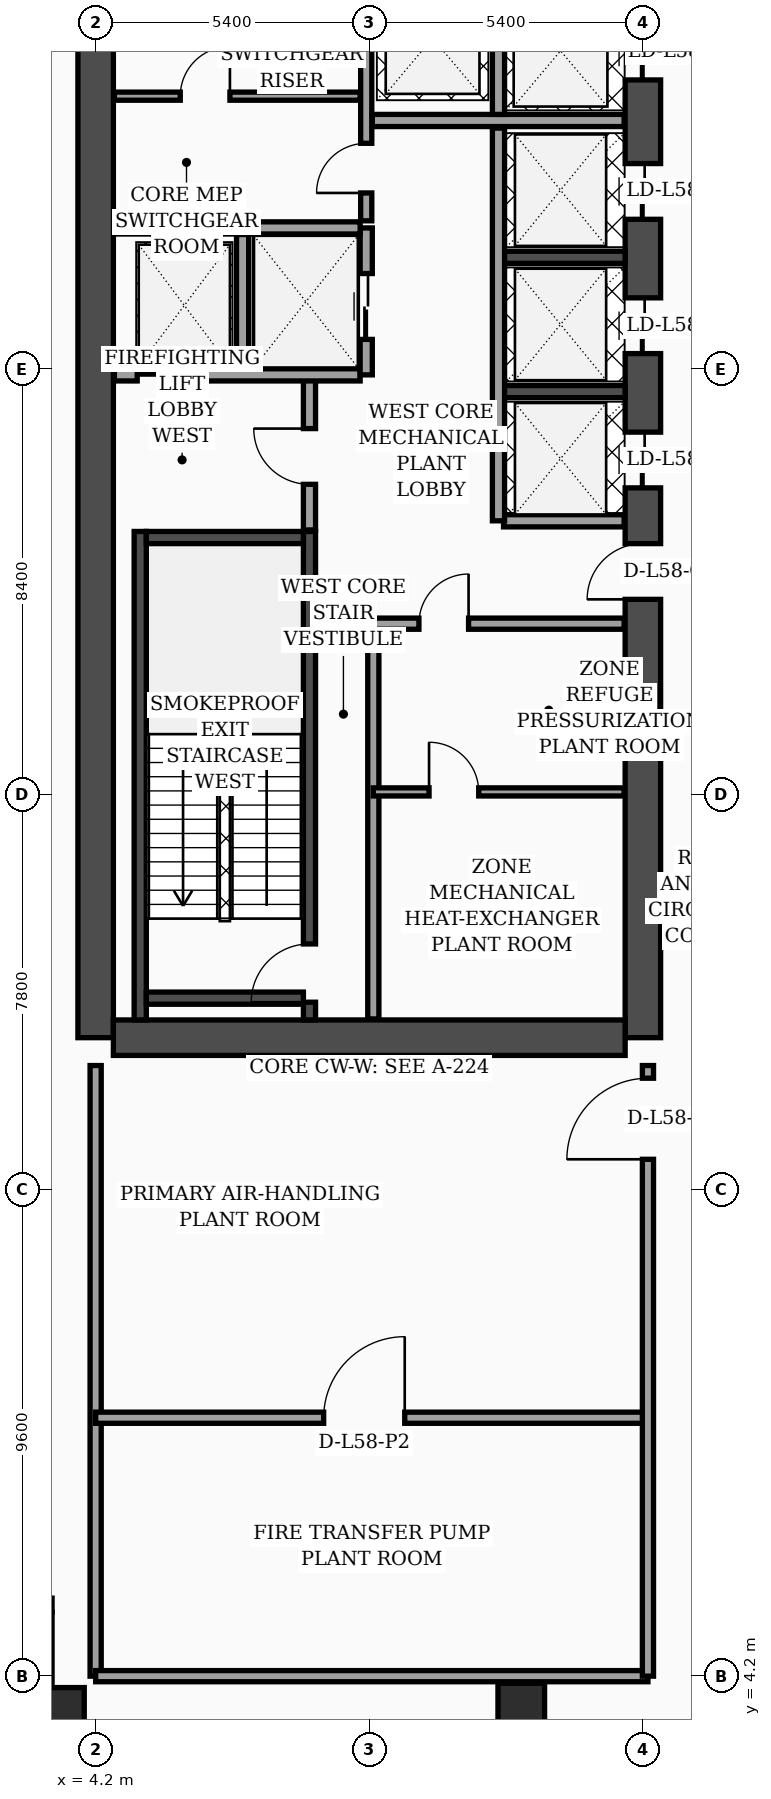
"""IFC4 building model, lengths in metres.
Left out: names, types, materials, properties, quantities, classifications, styles, units other than length and angle.
Written with IfcOpenShell. Run it as: python <this file> out.ifc"""

import sys

from ifc_helpers import new_model, si_unit, direction, frame, frame_2d, origin, origin_2d, place, context, subcontext, project, spatial, rectangle, hollow_rectangle, extrude, element, fill, save


model = new_model("IFC4")
c1 = context("Model", 3, precision=1e-05, world=origin(), true_north=direction((0.0, 1.0)))
c2 = subcontext(c1, "Body", "Model", "MODEL_VIEW")
j1 = project(units=[si_unit("LENGTHUNIT", "METRE"), si_unit("PLANEANGLEUNIT", "RADIAN")], contexts=[c1])
p1 = place(None, origin())
s1 = spatial("IfcSite", under=j1, at=p1, CompositionType="ELEMENT")
p2 = place(p1, origin())
s2 = spatial("IfcBuilding", under=s1, at=p2, CompositionType="ELEMENT")
p3 = place(p2, frame((0.0, 0.0, 234.5)))
s3 = spatial("IfcBuildingStorey", under=s2, at=p3, CompositionType="ELEMENT", Elevation=234.5)
p4 = place(p3, frame((4.2, 16.8, 0.0), z_axis=(0.0, 0.0, 1.0), x_axis=(0.0, 1.0, 0.0)))
e1 = element("IfcWall", 1, at=p4, inside=s3, PredefinedType="SHEAR", context=c2, shape_type="SweptSolid", body=[
    extrude(rectangle(XDim=21.6, YDim=0.7, at=frame_2d((10.8, 0.0))), origin(), (0.0, 0.0, 1.0), 4.56),
])
p5 = place(p3, frame((15.0, 16.8, 0.0), z_axis=(0.0, 0.0, 1.0), x_axis=(0.0, 1.0, 0.0)))
e2 = element("IfcWall", 2, at=p5, inside=s3, PredefinedType="SHEAR", context=c2, shape_type="SweptSolid", body=[
    extrude(rectangle(XDim=21.6, YDim=0.7, at=frame_2d((10.8, 0.0))), origin(), (0.0, 0.0, 1.0), 4.56),
])
p6 = place(p5, frame((8.65, 0.0, 0.0)))
e3 = element("IfcOpeningElement", 3, at=p6, cuts=e2, PredefinedType="OPENING", context=c2, shape_type="SweptSolid", body=[
    extrude(rectangle(XDim=1.1, YDim=2.2, at=frame_2d((0.55, 1.1))), frame((0.0, 0.36, 0.0), z_axis=(0.0, -1.0, 0.0), x_axis=(1.0, 0.0, 0.0)), (0.0, 0.0, 1.0), 0.72),
])
p7 = place(p5, frame((10.85, 0.0, 0.0)))
e4 = element("IfcOpeningElement", 4, at=p7, cuts=e2, PredefinedType="OPENING", context=c2, shape_type="SweptSolid", body=[
    extrude(rectangle(XDim=1.1, YDim=2.2, at=frame_2d((0.55, 1.1))), frame((0.0, 0.36, 0.0), z_axis=(0.0, -1.0, 0.0), x_axis=(1.0, 0.0, 0.0)), (0.0, 0.0, 1.0), 0.72),
])
p8 = place(p5, frame((13.5, 0.0, 0.0)))
e5 = element("IfcOpeningElement", 5, at=p8, cuts=e2, PredefinedType="OPENING", context=c2, shape_type="SweptSolid", body=[
    extrude(rectangle(XDim=1.1, YDim=2.2, at=frame_2d((0.55, 1.1))), frame((0.0, 0.36, 0.0), z_axis=(0.0, -1.0, 0.0), x_axis=(1.0, 0.0, 0.0)), (0.0, 0.0, 1.0), 0.72),
])
p9 = place(p5, frame((16.15, 0.0, 0.0)))
e6 = element("IfcOpeningElement", 6, at=p9, cuts=e2, PredefinedType="OPENING", context=c2, shape_type="SweptSolid", body=[
    extrude(rectangle(XDim=1.1, YDim=2.2, at=frame_2d((0.55, 1.1))), frame((0.0, 0.36, 0.0), z_axis=(0.0, -1.0, 0.0), x_axis=(1.0, 0.0, 0.0)), (0.0, 0.0, 1.0), 0.72),
])
p10 = place(p5, frame((18.9, 0.0, 0.0)))
e7 = element("IfcOpeningElement", 7, at=p10, cuts=e2, PredefinedType="OPENING", context=c2, shape_type="SweptSolid", body=[
    extrude(rectangle(XDim=1.1, YDim=2.2, at=frame_2d((0.55, 1.1))), frame((0.0, 0.36, 0.0), z_axis=(0.0, -1.0, 0.0), x_axis=(1.0, 0.0, 0.0)), (0.0, 0.0, 1.0), 0.72),
])
p11 = place(p3, frame((4.55, 16.8, 0.0), z_axis=(0.0, 0.0, 1.0), x_axis=(1.0, 0.0, 0.0)))
e8 = element("IfcWall", 8, at=p11, inside=s3, PredefinedType="SHEAR", context=c2, shape_type="SweptSolid", body=[
    extrude(rectangle(XDim=10.1, YDim=0.7, at=frame_2d((5.05, 0.0))), origin(), (0.0, 0.0, 1.0), 4.56),
])
p12 = place(p3, frame((5.08, 17.15, 0.0), z_axis=(0.0, 0.0, 1.0), x_axis=(0.0, 1.0, 0.0)))
e9 = element("IfcWall", 9, at=p12, inside=s3, PredefinedType="SOLIDWALL", context=c2, shape_type="SweptSolid", body=[
    extrude(rectangle(XDim=9.64, YDim=0.24, at=frame_2d((4.82, 0.0))), origin(), (0.0, 0.0, 1.0), 4.56),
])
p13 = place(p3, frame((8.42, 17.15, 0.0), z_axis=(0.0, 0.0, 1.0), x_axis=(0.0, 1.0, 0.0)))
e10 = element("IfcWall", 10, at=p13, inside=s3, PredefinedType="SOLIDWALL", context=c2, shape_type="SweptSolid", body=[
    extrude(rectangle(XDim=9.64, YDim=0.24, at=frame_2d((4.82, 0.0))), origin(), (0.0, 0.0, 1.0), 4.56),
])
p14 = place(p13, frame((0.35, 0.0, 0.0)))
e11 = element("IfcOpeningElement", 11, at=p14, cuts=e10, PredefinedType="OPENING", context=c2, shape_type="SweptSolid", body=[
    extrude(rectangle(XDim=1.15, YDim=2.2, at=frame_2d((0.575, 1.1))), frame((0.0, 0.13, 0.0), z_axis=(0.0, -1.0, 0.0), x_axis=(1.0, 0.0, 0.0)), (0.0, 0.0, 1.0), 0.26),
])
for number, where, z_axis, x_axis in (
    (12, (5.2, 17.58, 0.0), (0.0, 0.0, 1.0), (1.0, 0.0, 0.0)),
    (13, (5.2, 26.67, 0.0), (0.0, 0.0, 1.0), (1.0, 0.0, 0.0)),
):
    element("IfcWall", number, at=place(p3, frame(where, z_axis=z_axis, x_axis=x_axis)), inside=s3, PredefinedType="SOLIDWALL", context=c2, shape_type="SweptSolid", body=[
        extrude(rectangle(XDim=3.1, YDim=0.24, at=frame_2d((1.55, 0.0))), origin(), (0.0, 0.0, 1.0), 4.56),
    ])
for number, where, z_axis, x_axis in (
    (14, (12.18, 29.55, 0.0), (0.0, 0.0, 1.0), (1.0, 0.0, 0.0)),
    (15, (12.18, 32.2, 0.0), (0.0, 0.0, 1.0), (1.0, 0.0, 0.0)),
):
    element("IfcWall", number, at=place(p3, frame(where, z_axis=z_axis, x_axis=x_axis)), inside=s3, PredefinedType="SOLIDWALL", context=c2, shape_type="SweptSolid", body=[
        extrude(rectangle(XDim=2.47, YDim=0.24, at=frame_2d((1.235, 0.0))), origin(), (0.0, 0.0, 1.0), 4.56),
    ])
p15 = place(p3, frame((3.6, 3.6, 0.0), z_axis=(0.0, 0.0, 1.0), x_axis=(1.0, 0.0, 0.0)))
e16 = element("IfcColumn", 16, at=p15, inside=s3, PredefinedType="COLUMN", context=c2, shape_type="SweptSolid", body=[
    extrude(hollow_rectangle(XDim=0.75, YDim=0.75, WallThickness=0.032, at=origin_2d()), origin(), (0.0, 0.0, 1.0), 4.56),
])
p16 = place(p3, frame((12.6, 3.6, 0.0), z_axis=(0.0, 0.0, 1.0), x_axis=(1.0, 0.0, 0.0)))
e17 = element("IfcColumn", 17, at=p16, inside=s3, PredefinedType="COLUMN", context=c2, shape_type="SweptSolid", body=[
    extrude(rectangle(XDim=0.92, YDim=0.92, at=origin_2d()), origin(), (0.0, 0.0, 1.0), 4.56),
])
p17 = place(p3, frame((8.42, 26.82, 0.0), z_axis=(0.0, 0.0, 1.0), x_axis=(0.0, 1.0, 0.0)))
e18 = element("IfcWall", 18, at=p17, inside=s3, PredefinedType="SOLIDWALL", context=c2, shape_type="SweptSolid", body=[
    extrude(rectangle(XDim=3.0, YDim=0.24, at=frame_2d((1.5, 0.0))), origin(), (0.0, 0.0, 1.0), 4.56),
])
p18 = place(p17, frame((0.9, 0.0, 0.0)))
e19 = element("IfcOpeningElement", 19, at=p18, cuts=e18, PredefinedType="OPENING", context=c2, shape_type="SweptSolid", body=[
    extrude(rectangle(XDim=1.1, YDim=2.2, at=frame_2d((0.55, 1.1))), frame((0.0, 0.13, 0.0), z_axis=(0.0, -1.0, 0.0), x_axis=(1.0, 0.0, 0.0)), (0.0, 0.0, 1.0), 0.26),
])
p19 = place(p3, frame((4.57, 29.88, 0.0), z_axis=(0.0, 0.0, 1.0), x_axis=(1.0, 0.0, 0.0)))
e20 = element("IfcWall", 20, at=p19, inside=s3, PredefinedType="SOLIDWALL", context=c2, shape_type="SweptSolid", body=[
    extrude(rectangle(XDim=4.85, YDim=0.24, at=frame_2d((2.425, 0.0))), origin(), (0.0, 0.0, 1.0), 4.56),
])
p20 = place(p19, frame((0.45, 0.0, 0.0)))
e21 = element("IfcOpeningElement", 21, at=p20, cuts=e20, PredefinedType="OPENING", context=c2, shape_type="SweptSolid", body=[
    extrude(rectangle(XDim=1.3, YDim=2.35, at=frame_2d((0.65, 1.175))), frame((0.0, 0.13, 0.0), z_axis=(0.0, -1.0, 0.0), x_axis=(1.0, 0.0, 0.0)), (0.0, 0.0, 1.0), 0.26),
])
p21 = place(p3, frame((7.1, 30.02, 0.0), z_axis=(0.0, 0.0, 1.0), x_axis=(0.0, 1.0, 0.0)))
e22 = element("IfcWall", 22, at=p21, inside=s3, PredefinedType="SOLIDWALL", context=c2, shape_type="SweptSolid", body=[
    extrude(rectangle(XDim=2.63, YDim=0.24, at=frame_2d((1.315, 0.0))), origin(), (0.0, 0.0, 1.0), 4.56),
])
p22 = place(p3, frame((9.54, 29.88, 0.0), z_axis=(0.0, 0.0, 1.0), x_axis=(0.0, 1.0, 0.0)))
e23 = element("IfcWall", 23, at=p22, inside=s3, PredefinedType="SOLIDWALL", context=c2, shape_type="SweptSolid", body=[
    extrude(rectangle(XDim=2.9, YDim=0.24, at=frame_2d((1.45, 0.0))), origin(), (0.0, 0.0, 1.0), 4.56),
])
p23 = place(p22, frame((0.7, 0.0, 0.0)))
e24 = element("IfcOpeningElement", 24, at=p23, cuts=e23, PredefinedType="OPENING", context=c2, shape_type="SweptSolid", body=[
    extrude(rectangle(XDim=1.3, YDim=2.35, at=frame_2d((0.65, 1.175))), frame((0.0, 0.13, 0.0), z_axis=(0.0, -1.0, 0.0), x_axis=(1.0, 0.0, 0.0)), (0.0, 0.0, 1.0), 0.26),
])
p24 = place(p3, frame((4.57, 32.78, 0.0), z_axis=(0.0, 0.0, 1.0), x_axis=(1.0, 0.0, 0.0)))
e25 = element("IfcWall", 25, at=p24, inside=s3, PredefinedType="SOLIDWALL", context=c2, shape_type="SweptSolid", body=[
    extrude(rectangle(XDim=4.85, YDim=0.24, at=frame_2d((2.425, 0.0))), origin(), (0.0, 0.0, 1.0), 4.19),
])
p25 = place(p3, frame((9.68, 17.17, 0.0), z_axis=(0.0, 0.0, 1.0), x_axis=(0.0, 1.0, 0.0)))
e26 = element("IfcWall", 26, at=p25, inside=s3, PredefinedType="SOLIDWALL", context=c2, shape_type="SweptSolid", body=[
    extrude(rectangle(XDim=7.83, YDim=0.22, at=frame_2d((3.915, 0.0))), origin(), (0.0, 0.0, 1.0), 4.56),
])
p26 = place(p3, frame((4.57, 35.38, 0.0), z_axis=(0.0, 0.0, 1.0), x_axis=(1.0, 0.0, 0.0)))
e27 = element("IfcWall", 27, at=p26, inside=s3, PredefinedType="PARTITIONING", context=c2, shape_type="SweptSolid", body=[
    extrude(rectangle(XDim=4.85, YDim=0.16, at=frame_2d((2.425, 0.0))), origin(), (0.0, 0.0, 1.0), 4.56),
])
p27 = place(p26, frame((1.3, 0.0, 0.0)))
e28 = element("IfcOpeningElement", 28, at=p27, cuts=e27, PredefinedType="OPENING", context=c2, shape_type="SweptSolid", body=[
    extrude(rectangle(XDim=0.98, YDim=2.15, at=frame_2d((0.49, 1.075))), frame((0.0, 0.09, 0.0), z_axis=(0.0, -1.0, 0.0), x_axis=(1.0, 0.0, 0.0)), (0.0, 0.0, 1.0), 0.18),
])
p28 = place(p3, frame((9.54, 32.92, 0.0), z_axis=(0.0, 0.0, 1.0), x_axis=(0.0, 1.0, 0.0)))
e29 = element("IfcWall", 29, at=p28, inside=s3, PredefinedType="SOLIDWALL", context=c2, shape_type="SweptSolid", body=[
    extrude(rectangle(XDim=5.11, YDim=0.22, at=frame_2d((2.555, 0.0))), origin(), (0.0, 0.0, 1.0), 4.56),
])
p29 = place(p28, frame((0.55, 0.0, 0.0)))
e30 = element("IfcOpeningElement", 30, at=p29, cuts=e29, PredefinedType="OPENING", context=c2, shape_type="SweptSolid", body=[
    extrude(rectangle(XDim=0.98, YDim=2.15, at=frame_2d((0.49, 1.075))), frame((0.0, 0.12, 0.0), z_axis=(0.0, -1.0, 0.0), x_axis=(1.0, 0.0, 0.0)), (0.0, 0.0, 1.0), 0.24),
])
p30 = place(p3, frame((9.68, 21.65, 0.0), z_axis=(0.0, 0.0, 1.0), x_axis=(1.0, 0.0, 0.0)))
e31 = element("IfcWall", 31, at=p30, inside=s3, PredefinedType="PARTITIONING", context=c2, shape_type="SweptSolid", body=[
    extrude(rectangle(XDim=4.95, YDim=0.16, at=frame_2d((2.475, 0.0))), origin(), (0.0, 0.0, 1.0), 4.56),
])
p31 = place(p30, frame((1.1, 0.0, 0.0)))
e32 = element("IfcOpeningElement", 32, at=p31, cuts=e31, PredefinedType="OPENING", context=c2, shape_type="SweptSolid", body=[
    extrude(rectangle(XDim=0.98, YDim=2.15, at=frame_2d((0.49, 1.075))), frame((0.0, 0.09, 0.0), z_axis=(0.0, -1.0, 0.0), x_axis=(1.0, 0.0, 0.0)), (0.0, 0.0, 1.0), 0.18),
])
p32 = place(p3, frame((9.68, 24.97, 0.0), z_axis=(0.0, 0.0, 1.0), x_axis=(1.0, 0.0, 0.0)))
e33 = element("IfcWall", 33, at=p32, inside=s3, PredefinedType="SOLIDWALL", context=c2, shape_type="SweptSolid", body=[
    extrude(rectangle(XDim=4.95, YDim=0.22, at=frame_2d((2.475, 0.0))), origin(), (0.0, 0.0, 1.0), 3.94),
])
p33 = place(p32, frame((0.9, 0.0, 0.0)))
e34 = element("IfcOpeningElement", 34, at=p33, cuts=e33, PredefinedType="OPENING", context=c2, shape_type="SweptSolid", body=[
    extrude(rectangle(XDim=0.98, YDim=2.15, at=frame_2d((0.49, 1.075))), frame((0.0, 0.12, 0.0), z_axis=(0.0, -1.0, 0.0), x_axis=(1.0, 0.0, 0.0)), (0.0, 0.0, 1.0), 0.24),
])
p34 = place(p3, frame((12.25, 27.0, 0.0), z_axis=(0.0, 0.0, 1.0), x_axis=(1.0, 0.0, 0.0)))
e35 = element("IfcWall", 35, at=p34, inside=s3, PredefinedType="SOLIDWALL", context=c2, shape_type="SweptSolid", body=[
    extrude(rectangle(XDim=2.38, YDim=0.24, at=frame_2d((1.19, 0.0))), origin(), (0.0, 0.0, 1.0), 4.56),
])
p35 = place(p3, frame((12.15, 27.0, 0.0), z_axis=(0.0, 0.0, 1.0), x_axis=(0.0, 1.0, 0.0)))
e36 = element("IfcWall", 36, at=p35, inside=s3, PredefinedType="SOLIDWALL", context=c2, shape_type="SweptSolid", body=[
    extrude(rectangle(XDim=7.75, YDim=0.24, at=frame_2d((3.875, 0.0))), origin(), (0.0, 0.0, 1.0), 4.56),
])
p36 = place(p3, frame((9.66, 34.9, 0.0), z_axis=(0.0, 0.0, 1.0), x_axis=(1.0, 0.0, 0.0)))
e37 = element("IfcWall", 37, at=p36, inside=s3, PredefinedType="SOLIDWALL", context=c2, shape_type="SweptSolid", body=[
    extrude(rectangle(XDim=4.97, YDim=0.24, at=frame_2d((2.485, 0.0))), origin(), (0.0, 0.0, 1.0), 4.56),
])
p37 = place(p3, frame((12.15, 35.02, 0.0), z_axis=(0.0, 0.0, 1.0), x_axis=(0.0, 1.0, 0.0)))
e38 = element("IfcWall", 38, at=p37, inside=s3, PredefinedType="SOLIDWALL", context=c2, shape_type="SweptSolid", body=[
    extrude(rectangle(XDim=3.01, YDim=0.24, at=frame_2d((1.505, 0.0))), origin(), (0.0, 0.0, 1.0), 4.56),
])
p38 = place(p3, frame((4.2, 4.2, 0.0), z_axis=(0.0, 0.0, 1.0), x_axis=(0.0, 1.0, 0.0)))
e39 = element("IfcWall", 39, at=p38, inside=s3, PredefinedType="SOLIDWALL", context=c2, shape_type="SweptSolid", body=[
    extrude(rectangle(XDim=12.05, YDim=0.22, at=frame_2d((6.025, 0.0))), origin(), (0.0, 0.0, 1.0), 3.94),
])
p39 = place(p3, frame((4.2, 4.2, 0.0), z_axis=(0.0, 0.0, 1.0), x_axis=(1.0, 0.0, 0.0)))
e40 = element("IfcWall", 40, at=p39, inside=s3, PredefinedType="SOLIDWALL", context=c2, shape_type="SweptSolid", body=[
    extrude(rectangle(XDim=10.9, YDim=0.22, at=frame_2d((5.45, 0.0))), origin(), (0.0, 0.0, 1.0), 3.94),
])
p40 = place(p3, frame((4.2, 9.3, 0.0), z_axis=(0.0, 0.0, 1.0), x_axis=(1.0, 0.0, 0.0)))
e41 = element("IfcWall", 41, at=p40, inside=s3, PredefinedType="SOLIDWALL", context=c2, shape_type="SweptSolid", body=[
    extrude(rectangle(XDim=10.9, YDim=0.22, at=frame_2d((5.45, 0.0))), origin(), (0.0, 0.0, 1.0), 3.94),
])
p41 = place(p40, frame((4.5, 0.0, 0.0)))
e42 = element("IfcOpeningElement", 42, at=p41, cuts=e41, PredefinedType="OPENING", context=c2, shape_type="SweptSolid", body=[
    extrude(rectangle(XDim=1.6, YDim=2.35, at=frame_2d((0.8, 1.175))), frame((0.0, 0.12, 0.0), z_axis=(0.0, -1.0, 0.0), x_axis=(1.0, 0.0, 0.0)), (0.0, 0.0, 1.0), 0.24),
])
p42 = place(p3, frame((15.1, 4.2, 0.0), z_axis=(0.0, 0.0, 1.0), x_axis=(0.0, 1.0, 0.0)))
e43 = element("IfcWall", 43, at=p42, inside=s3, PredefinedType="SOLIDWALL", context=c2, shape_type="SweptSolid", body=[
    extrude(rectangle(XDim=12.05, YDim=0.22, at=frame_2d((6.025, 0.0))), origin(), (0.0, 0.0, 1.0), 3.59),
])
p43 = place(p42, frame((10.2, 0.0, 0.0)))
e44 = element("IfcOpeningElement", 44, at=p43, cuts=e43, PredefinedType="OPENING", context=c2, shape_type="SweptSolid", body=[
    extrude(rectangle(XDim=1.6, YDim=2.35, at=frame_2d((0.8, 1.175))), frame((0.0, 0.12, 0.0), z_axis=(0.0, -1.0, 0.0), x_axis=(1.0, 0.0, 0.0)), (0.0, 0.0, 1.0), 0.24),
])
p44 = place(p18, origin())
e45 = element("IfcDoor", 45, at=p44, inside=s3, OperationType="SINGLE_SWING_RIGHT", PredefinedType="DOOR", context=c2, shape_type="SweptSolid", body=[
    extrude(rectangle(XDim=1.1, YDim=2.2, at=frame_2d((0.55, 1.1))), frame((0.0, 0.025, 0.0), z_axis=(0.0, -1.0, 0.0), x_axis=(1.0, 0.0, 0.0)), (0.0, 0.0, 1.0), 0.05),
])
fill(e19, e45)
p45 = place(p20, origin())
e46 = element("IfcDoor", 46, at=p45, inside=s3, OperationType="DOUBLE_DOOR_SLIDING", PredefinedType="DOOR", context=c2, shape_type="SweptSolid", body=[
    extrude(rectangle(XDim=1.3, YDim=2.35, at=frame_2d((0.65, 1.175))), frame((0.0, 0.025, 0.0), z_axis=(0.0, -1.0, 0.0), x_axis=(1.0, 0.0, 0.0)), (0.0, 0.0, 1.0), 0.05),
])
fill(e21, e46)
p46 = place(p23, origin())
e47 = element("IfcDoor", 47, at=p46, inside=s3, OperationType="DOUBLE_DOOR_SLIDING", PredefinedType="DOOR", context=c2, shape_type="SweptSolid", body=[
    extrude(rectangle(XDim=1.3, YDim=2.35, at=frame_2d((0.65, 1.175))), frame((0.0, 0.025, 0.0), z_axis=(0.0, -1.0, 0.0), x_axis=(1.0, 0.0, 0.0)), (0.0, 0.0, 1.0), 0.05),
])
fill(e24, e47)
p47 = place(p27, origin())
e48 = element("IfcDoor", 48, at=p47, inside=s3, OperationType="SINGLE_SWING_RIGHT", PredefinedType="DOOR", context=c2, shape_type="SweptSolid", body=[
    extrude(rectangle(XDim=0.98, YDim=2.15, at=frame_2d((0.49, 1.075))), frame((0.0, 0.025, 0.0), z_axis=(0.0, -1.0, 0.0), x_axis=(1.0, 0.0, 0.0)), (0.0, 0.0, 1.0), 0.05),
])
fill(e28, e48)
p48 = place(p29, origin())
e49 = element("IfcDoor", 49, at=p48, inside=s3, OperationType="SINGLE_SWING_LEFT", PredefinedType="DOOR", context=c2, shape_type="SweptSolid", body=[
    extrude(rectangle(XDim=0.98, YDim=2.15, at=frame_2d((0.49, 1.075))), frame((0.0, 0.025, 0.0), z_axis=(0.0, -1.0, 0.0), x_axis=(1.0, 0.0, 0.0)), (0.0, 0.0, 1.0), 0.05),
])
fill(e30, e49)
p49 = place(p31, origin())
e50 = element("IfcDoor", 50, at=p49, inside=s3, OperationType="SINGLE_SWING_LEFT", PredefinedType="DOOR", context=c2, shape_type="SweptSolid", body=[
    extrude(rectangle(XDim=0.98, YDim=2.15, at=frame_2d((0.49, 1.075))), frame((0.0, 0.025, 0.0), z_axis=(0.0, -1.0, 0.0), x_axis=(1.0, 0.0, 0.0)), (0.0, 0.0, 1.0), 0.05),
])
fill(e32, e50)
p50 = place(p33, origin())
e51 = element("IfcDoor", 51, at=p50, inside=s3, OperationType="SINGLE_SWING_RIGHT", PredefinedType="DOOR", context=c2, shape_type="SweptSolid", body=[
    extrude(rectangle(XDim=0.98, YDim=2.15, at=frame_2d((0.49, 1.075))), frame((0.0, 0.025, 0.0), z_axis=(0.0, -1.0, 0.0), x_axis=(1.0, 0.0, 0.0)), (0.0, 0.0, 1.0), 0.05),
])
fill(e34, e51)
p51 = place(p41, origin())
e52 = element("IfcDoor", 52, at=p51, inside=s3, OperationType="SINGLE_SWING_RIGHT", PredefinedType="DOOR", context=c2, shape_type="SweptSolid", body=[
    extrude(rectangle(XDim=1.6, YDim=2.35, at=frame_2d((0.8, 1.175))), frame((0.0, 0.025, 0.0), z_axis=(0.0, -1.0, 0.0), x_axis=(1.0, 0.0, 0.0)), (0.0, 0.0, 1.0), 0.05),
])
fill(e42, e52)
p52 = place(p43, origin())
e53 = element("IfcDoor", 53, at=p52, inside=s3, OperationType="SINGLE_SWING_LEFT", PredefinedType="DOOR", context=c2, shape_type="SweptSolid", body=[
    extrude(rectangle(XDim=1.6, YDim=2.35, at=frame_2d((0.8, 1.175))), frame((0.0, 0.025, 0.0), z_axis=(0.0, -1.0, 0.0), x_axis=(1.0, 0.0, 0.0)), (0.0, 0.0, 1.0), 0.05),
])
fill(e44, e53)
p53 = place(p14, origin())
e54 = element("IfcDoor", 54, at=p53, inside=s3, OperationType="SINGLE_SWING_LEFT", PredefinedType="DOOR", context=c2, shape_type="SweptSolid", body=[
    extrude(rectangle(XDim=1.15, YDim=2.2, at=frame_2d((0.575, 1.1))), frame((0.0, 0.025, 0.0), z_axis=(0.0, -1.0, 0.0), x_axis=(1.0, 0.0, 0.0)), (0.0, 0.0, 1.0), 0.05),
])
fill(e11, e54)
p54 = place(p6, origin())
e55 = element("IfcDoor", 55, at=p54, inside=s3, OperationType="SINGLE_SWING_LEFT", PredefinedType="DOOR", context=c2, shape_type="SweptSolid", body=[
    extrude(rectangle(XDim=1.1, YDim=2.2, at=frame_2d((0.55, 1.1))), frame((0.0, 0.025, 0.0), z_axis=(0.0, -1.0, 0.0), x_axis=(1.0, 0.0, 0.0)), (0.0, 0.0, 1.0), 0.05),
])
fill(e3, e55)
p55 = place(p7, origin())
e56 = element("IfcDoor", 56, at=p55, inside=s3, OperationType="DOUBLE_DOOR_SLIDING", PredefinedType="DOOR", context=c2, shape_type="SweptSolid", body=[
    extrude(rectangle(XDim=1.1, YDim=2.2, at=frame_2d((0.55, 1.1))), frame((0.0, 0.025, 0.0), z_axis=(0.0, -1.0, 0.0), x_axis=(1.0, 0.0, 0.0)), (0.0, 0.0, 1.0), 0.05),
])
fill(e4, e56)
p56 = place(p8, origin())
e57 = element("IfcDoor", 57, at=p56, inside=s3, OperationType="DOUBLE_DOOR_SLIDING", PredefinedType="DOOR", context=c2, shape_type="SweptSolid", body=[
    extrude(rectangle(XDim=1.1, YDim=2.2, at=frame_2d((0.55, 1.1))), frame((0.0, 0.025, 0.0), z_axis=(0.0, -1.0, 0.0), x_axis=(1.0, 0.0, 0.0)), (0.0, 0.0, 1.0), 0.05),
])
fill(e5, e57)
p57 = place(p9, origin())
e58 = element("IfcDoor", 58, at=p57, inside=s3, OperationType="DOUBLE_DOOR_SLIDING", PredefinedType="DOOR", context=c2, shape_type="SweptSolid", body=[
    extrude(rectangle(XDim=1.1, YDim=2.2, at=frame_2d((0.55, 1.1))), frame((0.0, 0.025, 0.0), z_axis=(0.0, -1.0, 0.0), x_axis=(1.0, 0.0, 0.0)), (0.0, 0.0, 1.0), 0.05),
])
fill(e6, e58)
p58 = place(p10, origin())
e59 = element("IfcDoor", 59, at=p58, inside=s3, OperationType="DOUBLE_DOOR_SLIDING", PredefinedType="DOOR", context=c2, shape_type="SweptSolid", body=[
    extrude(rectangle(XDim=1.1, YDim=2.2, at=frame_2d((0.55, 1.1))), frame((0.0, 0.025, 0.0), z_axis=(0.0, -1.0, 0.0), x_axis=(1.0, 0.0, 0.0)), (0.0, 0.0, 1.0), 0.05),
])
fill(e7, e59)
save(model, sys.argv[1])
